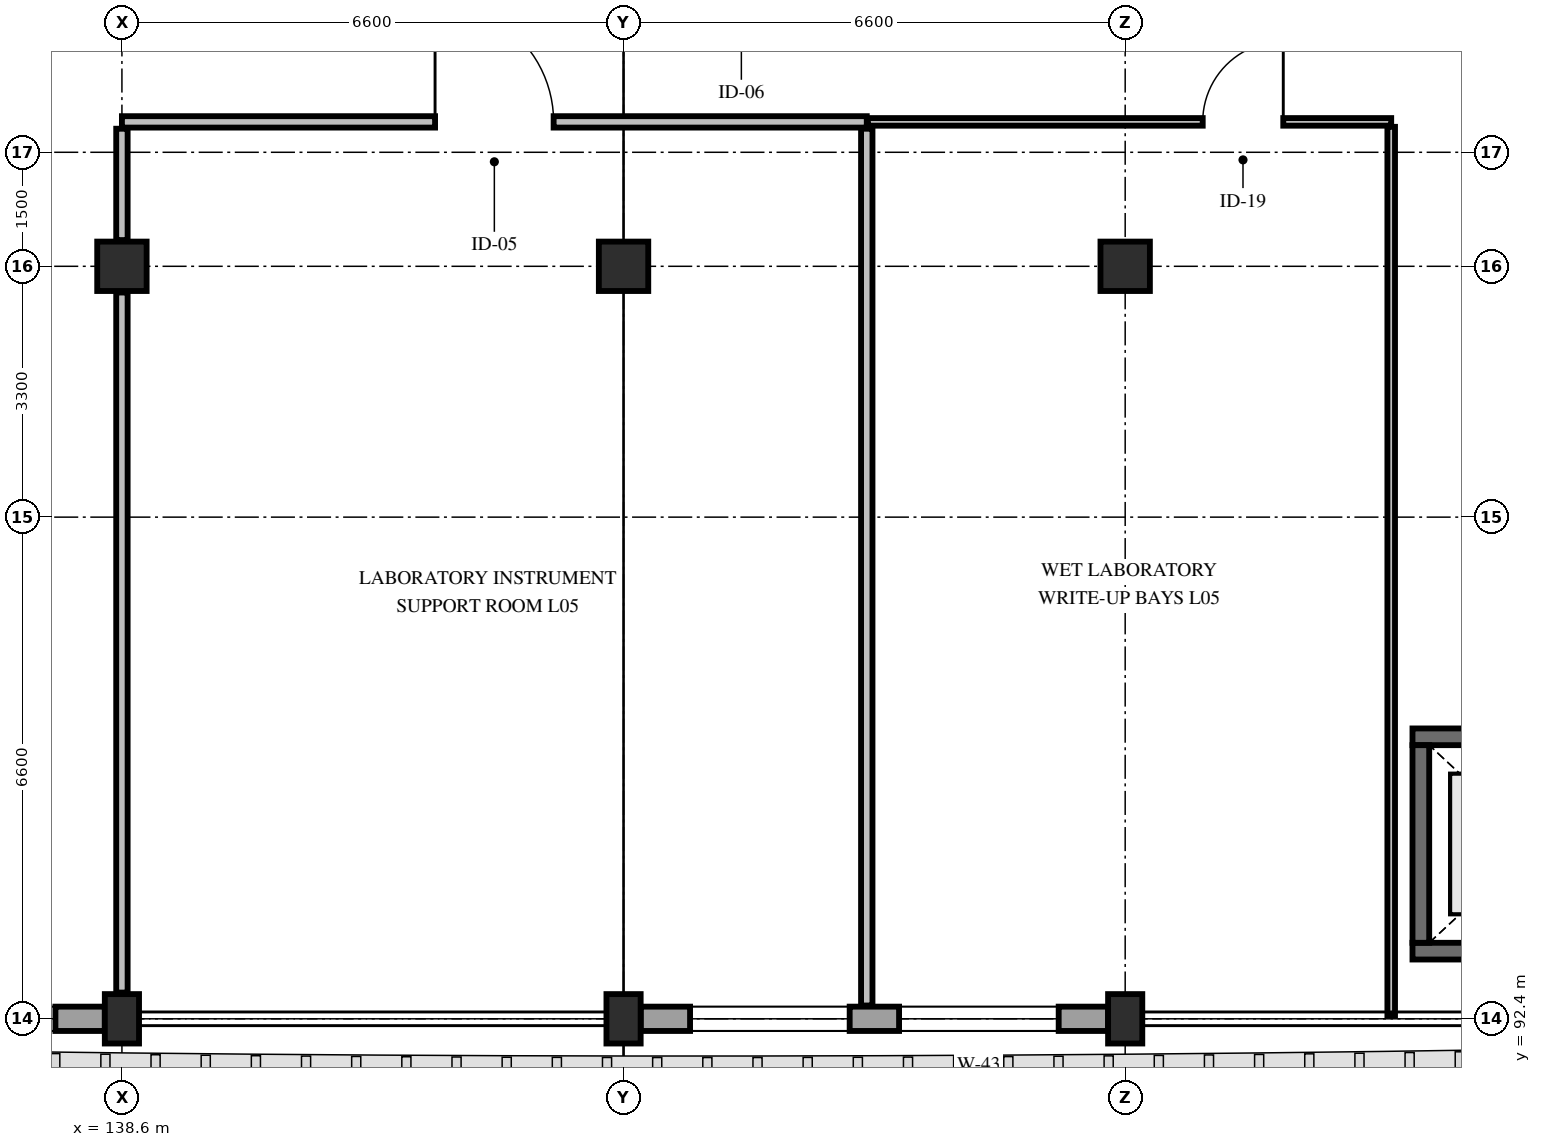
"""IFC4 building model, lengths in metres.
Left out: names, types, materials, properties, quantities, classifications, styles, units other than length and angle.
Written with IfcOpenShell. Run it as: python <this file> out.ifc"""

import sys

from ifc_helpers import new_model, si_unit, direction, frame, frame_2d, origin, origin_2d, place, context, subcontext, project, spatial, rectangle, extrude, element, fill, save


model = new_model("IFC4")
c1 = context("Model", 3, precision=1e-05, world=origin(), true_north=direction((0.0, 1.0)))
c2 = subcontext(c1, "Body", "Model", "MODEL_VIEW")
j1 = project(units=[si_unit("LENGTHUNIT", "METRE"), si_unit("PLANEANGLEUNIT", "RADIAN")], contexts=[c1])
p1 = place(None, origin())
s1 = spatial("IfcSite", under=j1, at=p1, CompositionType="ELEMENT")
p2 = place(p1, origin())
s2 = spatial("IfcBuilding", under=s1, at=p2, CompositionType="ELEMENT")
p3 = place(p2, frame((0.0, 0.0, 24.6)))
s3 = spatial("IfcBuildingStorey", under=s2, at=p3, CompositionType="ELEMENT", Elevation=24.6)
p4 = place(p3, frame((138.6, 92.4, 0.0), z_axis=(0.0, 0.0, 1.0), x_axis=(1.0, 0.0, 0.0)))
e1 = element("IfcColumn", 1, at=p4, inside=s3, PredefinedType="PILASTER", context=c2, shape_type="SweptSolid", body=[
    extrude(rectangle(XDim=0.45, YDim=0.65, at=origin_2d()), origin(), (0.0, 0.0, 1.0), 4.8),
])
p5 = place(p3, frame((138.6, 102.3, 0.0), z_axis=(0.0, 0.0, 1.0), x_axis=(1.0, 0.0, 0.0)))
e2 = element("IfcColumn", 2, at=p5, inside=s3, PredefinedType="COLUMN", context=c2, shape_type="SweptSolid", body=[
    extrude(rectangle(XDim=0.65, YDim=0.65, at=origin_2d()), origin(), (0.0, 0.0, 1.0), 4.8),
])
p6 = place(p3, frame((145.2, 92.4, 0.0), z_axis=(0.0, 0.0, 1.0), x_axis=(1.0, 0.0, 0.0)))
e3 = element("IfcColumn", 3, at=p6, inside=s3, PredefinedType="PILASTER", context=c2, shape_type="SweptSolid", body=[
    extrude(rectangle(XDim=0.45, YDim=0.65, at=origin_2d()), origin(), (0.0, 0.0, 1.0), 4.8),
])
p7 = place(p3, frame((145.2, 102.3, 0.0), z_axis=(0.0, 0.0, 1.0), x_axis=(1.0, 0.0, 0.0)))
e4 = element("IfcColumn", 4, at=p7, inside=s3, PredefinedType="COLUMN", context=c2, shape_type="SweptSolid", body=[
    extrude(rectangle(XDim=0.65, YDim=0.65, at=origin_2d()), origin(), (0.0, 0.0, 1.0), 4.8),
])
p8 = place(p3, frame((151.8, 92.4, 0.0), z_axis=(0.0, 0.0, 1.0), x_axis=(1.0, 0.0, 0.0)))
e5 = element("IfcColumn", 5, at=p8, inside=s3, PredefinedType="PILASTER", context=c2, shape_type="SweptSolid", body=[
    extrude(rectangle(XDim=0.45, YDim=0.65, at=origin_2d()), origin(), (0.0, 0.0, 1.0), 4.8),
])
p9 = place(p3, frame((151.8, 102.3, 0.0), z_axis=(0.0, 0.0, 1.0), x_axis=(1.0, 0.0, 0.0)))
e6 = element("IfcColumn", 6, at=p9, inside=s3, PredefinedType="COLUMN", context=c2, shape_type="SweptSolid", body=[
    extrude(rectangle(XDim=0.65, YDim=0.65, at=origin_2d()), origin(), (0.0, 0.0, 1.0), 4.8),
])
p10 = place(p3, frame((151.575, 92.4, 0.0), z_axis=(0.0, 0.0, 1.0), x_axis=(-1.0, 0.0, 0.0)))
e7 = element("IfcWall", 7, at=p10, inside=s3, PredefinedType="STANDARD", context=c2, shape_type="SweptSolid", body=[
    extrude(rectangle(XDim=6.15, YDim=0.32, at=frame_2d((3.075, 0.0))), origin(), (0.0, 0.0, 1.0), 3.78),
])
p11 = place(p10, frame((0.65, 0.0, 0.85)))
e8 = element("IfcOpeningElement", 8, at=p11, cuts=e7, PredefinedType="OPENING", context=c2, shape_type="SweptSolid", body=[
    extrude(rectangle(XDim=2.1, YDim=2.08, at=frame_2d((1.05, 1.04))), frame((0.0, 0.175, 0.0), z_axis=(0.0, -1.0, 0.0), x_axis=(1.0, 0.0, 0.0)), (0.0, 0.0, 1.0), 0.35),
])
p12 = place(p10, frame((3.4, 0.0, 0.85)))
e9 = element("IfcOpeningElement", 9, at=p12, cuts=e7, PredefinedType="OPENING", context=c2, shape_type="SweptSolid", body=[
    extrude(rectangle(XDim=2.1, YDim=2.08, at=frame_2d((1.05, 1.04))), frame((0.0, 0.175, 0.0), z_axis=(0.0, -1.0, 0.0), x_axis=(1.0, 0.0, 0.0)), (0.0, 0.0, 1.0), 0.35),
])
p13 = place(p3, frame((138.375, 92.4, 0.0), z_axis=(0.0, 0.0, 1.0), x_axis=(-1.0, 0.0, 0.0)))
e10 = element("IfcWall", 10, at=p13, inside=s3, PredefinedType="STANDARD", context=c2, shape_type="SweptSolid", body=[
    extrude(rectangle(XDim=6.15, YDim=0.32, at=frame_2d((3.075, 0.0))), origin(), (0.0, 0.0, 1.0), 3.78),
])
p14 = place(p13, frame((0.65, 0.0, 0.85)))
e11 = element("IfcOpeningElement", 11, at=p14, cuts=e10, PredefinedType="OPENING", context=c2, shape_type="SweptSolid", body=[
    extrude(rectangle(XDim=2.1, YDim=2.08, at=frame_2d((1.05, 1.04))), frame((0.0, 0.175, 0.0), z_axis=(0.0, -1.0, 0.0), x_axis=(1.0, 0.0, 0.0)), (0.0, 0.0, 1.0), 0.35),
])
p15 = place(p13, frame((3.4, 0.0, 0.85)))
e12 = element("IfcOpeningElement", 12, at=p15, cuts=e10, PredefinedType="OPENING", context=c2, shape_type="SweptSolid", body=[
    extrude(rectangle(XDim=2.1, YDim=2.08, at=frame_2d((1.05, 1.04))), frame((0.0, 0.175, 0.0), z_axis=(0.0, -1.0, 0.0), x_axis=(1.0, 0.0, 0.0)), (0.0, 0.0, 1.0), 0.35),
])
p16 = place(p3, frame((155.58, 93.29, 0.0), z_axis=(0.0, 0.0, 1.0), x_axis=(1.0, 0.0, 0.0)))
e13 = element("IfcWall", 13, at=p16, inside=s3, PredefinedType="SHEAR", context=c2, shape_type="SweptSolid", body=[
    extrude(rectangle(XDim=3.24, YDim=0.22, at=frame_2d((1.62, 0.0))), origin(), (0.0, 0.0, 1.0), 4.48),
])
p17 = place(p3, frame((155.58, 96.11, 0.0), z_axis=(0.0, 0.0, 1.0), x_axis=(1.0, 0.0, 0.0)))
e14 = element("IfcWall", 14, at=p17, inside=s3, PredefinedType="SHEAR", context=c2, shape_type="SweptSolid", body=[
    extrude(rectangle(XDim=3.24, YDim=0.22, at=frame_2d((1.62, 0.0))), origin(), (0.0, 0.0, 1.0), 4.48),
])
p18 = place(p17, frame((0.92, 0.0, 0.0)))
e15 = element("IfcOpeningElement", 15, at=p18, cuts=e14, PredefinedType="OPENING", context=c2, shape_type="SweptSolid", body=[
    extrude(rectangle(XDim=1.4, YDim=2.3, at=frame_2d((0.7, 1.15))), frame((0.0, 0.125, 0.0), z_axis=(0.0, -1.0, 0.0), x_axis=(1.0, 0.0, 0.0)), (0.0, 0.0, 1.0), 0.25),
])
p19 = place(p3, frame((155.69, 93.4, 0.0), z_axis=(0.0, 0.0, 1.0), x_axis=(0.0, 1.0, 0.0)))
e16 = element("IfcWall", 16, at=p19, inside=s3, PredefinedType="SHEAR", context=c2, shape_type="SweptSolid", body=[
    extrude(rectangle(XDim=2.6, YDim=0.22, at=frame_2d((1.3, 0.0))), origin(), (0.0, 0.0, 1.0), 4.48),
])
p20 = place(p3, frame((138.6, 104.2, 0.0), z_axis=(0.0, 0.0, 1.0), x_axis=(1.0, 0.0, 0.0)))
e17 = element("IfcWall", 17, at=p20, inside=s3, PredefinedType="PARTITIONING", context=c2, shape_type="SweptSolid", body=[
    extrude(rectangle(XDim=9.8, YDim=0.15, at=frame_2d((4.9, 0.0))), origin(), (0.0, 0.0, 1.0), 3.78),
])
p21 = place(p20, frame((4.12, 0.0, 0.0)))
e18 = element("IfcOpeningElement", 18, at=p21, cuts=e17, PredefinedType="OPENING", context=c2, shape_type="SweptSolid", body=[
    extrude(rectangle(XDim=1.56, YDim=2.3, at=frame_2d((0.78, 1.15))), frame((0.0, 0.09, 0.0), z_axis=(0.0, -1.0, 0.0), x_axis=(1.0, 0.0, 0.0)), (0.0, 0.0, 1.0), 0.18),
])
p22 = place(p3, frame((138.6, 92.745, 0.0), z_axis=(0.0, 0.0, 1.0), x_axis=(0.0, 1.0, 0.0)))
e19 = element("IfcWall", 19, at=p22, inside=s3, PredefinedType="PARTITIONING", context=c2, shape_type="SweptSolid", body=[
    extrude(rectangle(XDim=9.21, YDim=0.15, at=frame_2d((4.605, 0.0))), origin(), (0.0, 0.0, 1.0), 3.78),
])
p23 = place(p3, frame((138.6, 102.645, 0.0), z_axis=(0.0, 0.0, 1.0), x_axis=(0.0, 1.0, 0.0)))
e20 = element("IfcWall", 20, at=p23, inside=s3, PredefinedType="PARTITIONING", context=c2, shape_type="SweptSolid", body=[
    extrude(rectangle(XDim=1.465, YDim=0.15, at=frame_2d((0.732, 0.0))), origin(), (0.0, 0.0, 1.0), 3.78),
])
p24 = place(p3, frame((148.4, 92.575, 0.0), z_axis=(0.0, 0.0, 1.0), x_axis=(0.0, 1.0, 0.0)))
e21 = element("IfcWall", 21, at=p24, inside=s3, PredefinedType="PARTITIONING", context=c2, shape_type="SweptSolid", body=[
    extrude(rectangle(XDim=11.535, YDim=0.15, at=frame_2d((5.768, 0.0))), origin(), (0.0, 0.0, 1.0), 3.93),
])
p25 = place(p3, frame((148.415, 104.2, 0.0), z_axis=(0.0, 0.0, 1.0), x_axis=(1.0, 0.0, 0.0)))
e22 = element("IfcWall", 22, at=p25, inside=s3, PredefinedType="PARTITIONING", context=c2, shape_type="SweptSolid", body=[
    extrude(rectangle(XDim=6.885, YDim=0.1, at=frame_2d((3.442, 0.0))), origin(), (0.0, 0.0, 1.0), 3.78),
])
p26 = place(p25, frame((4.405, 0.0, 0.0)))
e23 = element("IfcOpeningElement", 23, at=p26, cuts=e22, PredefinedType="OPENING", context=c2, shape_type="SweptSolid", body=[
    extrude(rectangle(XDim=1.06, YDim=2.2, at=frame_2d((0.53, 1.1))), frame((0.0, 0.065, 0.0), z_axis=(0.0, -1.0, 0.0), x_axis=(1.0, 0.0, 0.0)), (0.0, 0.0, 1.0), 0.13),
])
p27 = place(p3, frame((155.3, 92.44, 0.0), z_axis=(0.0, 0.0, 1.0), x_axis=(0.0, 1.0, 0.0)))
e24 = element("IfcWall", 24, at=p27, inside=s3, PredefinedType="PARTITIONING", context=c2, shape_type="SweptSolid", body=[
    extrude(rectangle(XDim=11.695, YDim=0.1, at=frame_2d((5.848, 0.0))), origin(), (0.0, 0.0, 1.0), 3.93),
])
p28 = place(p11, origin())
e25 = element("IfcWindow", 25, at=p28, inside=s3, PartitioningType="DOUBLE_PANEL_VERTICAL", PredefinedType="WINDOW", context=c2, shape_type="SweptSolid", body=[
    extrude(rectangle(XDim=2.1, YDim=2.08, at=frame_2d((1.05, 1.04))), frame((0.0, 0.03, 0.0), z_axis=(0.0, -1.0, 0.0), x_axis=(1.0, 0.0, 0.0)), (0.0, 0.0, 1.0), 0.06),
])
fill(e8, e25)
p29 = place(p12, origin())
e26 = element("IfcWindow", 26, at=p29, inside=s3, PartitioningType="DOUBLE_PANEL_VERTICAL", PredefinedType="WINDOW", context=c2, shape_type="SweptSolid", body=[
    extrude(rectangle(XDim=2.1, YDim=2.08, at=frame_2d((1.05, 1.04))), frame((0.0, 0.03, 0.0), z_axis=(0.0, -1.0, 0.0), x_axis=(1.0, 0.0, 0.0)), (0.0, 0.0, 1.0), 0.06),
])
fill(e9, e26)
p30 = place(p14, origin())
e27 = element("IfcWindow", 27, at=p30, inside=s3, PartitioningType="DOUBLE_PANEL_VERTICAL", PredefinedType="WINDOW", context=c2, shape_type="SweptSolid", body=[
    extrude(rectangle(XDim=2.1, YDim=2.08, at=frame_2d((1.05, 1.04))), frame((0.0, 0.03, 0.0), z_axis=(0.0, -1.0, 0.0), x_axis=(1.0, 0.0, 0.0)), (0.0, 0.0, 1.0), 0.06),
])
fill(e11, e27)
p31 = place(p21, origin())
e28 = element("IfcDoor", 28, at=p31, inside=s3, OperationType="SINGLE_SWING_LEFT", PredefinedType="DOOR", context=c2, shape_type="SweptSolid", body=[
    extrude(rectangle(XDim=1.56, YDim=2.3, at=frame_2d((0.78, 1.15))), frame((0.0, 0.025, 0.0), z_axis=(0.0, -1.0, 0.0), x_axis=(1.0, 0.0, 0.0)), (0.0, 0.0, 1.0), 0.05),
])
fill(e18, e28)
p32 = place(p26, origin())
e29 = element("IfcDoor", 29, at=p32, inside=s3, OperationType="SINGLE_SWING_RIGHT", PredefinedType="DOOR", context=c2, shape_type="SweptSolid", body=[
    extrude(rectangle(XDim=1.06, YDim=2.2, at=frame_2d((0.53, 1.1))), frame((0.0, 0.025, 0.0), z_axis=(0.0, -1.0, 0.0), x_axis=(1.0, 0.0, 0.0)), (0.0, 0.0, 1.0), 0.05),
])
fill(e23, e29)
save(model, sys.argv[1])
